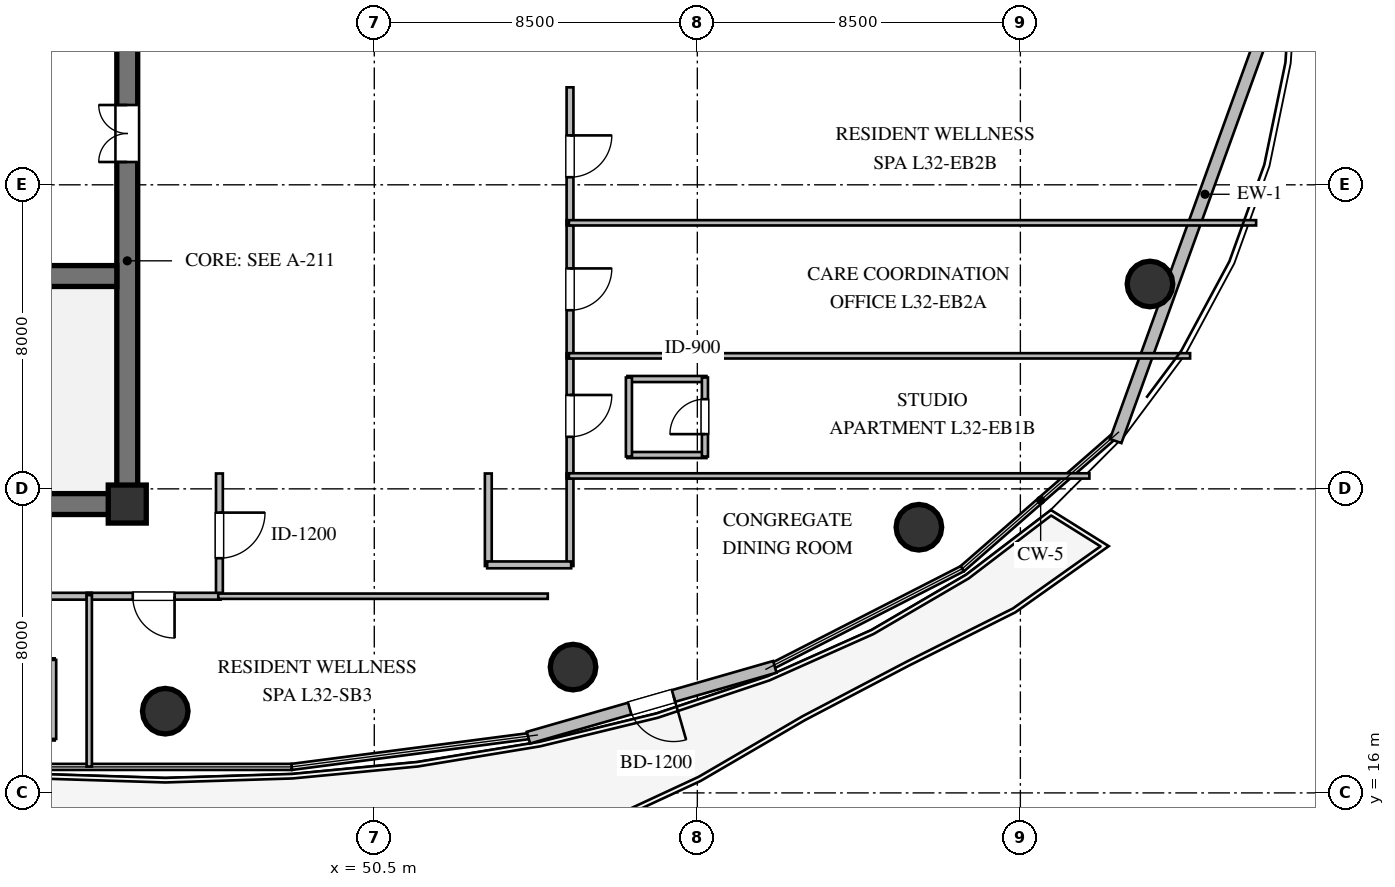
"""IFC4 building model, lengths in metres.
Left out: names, types, materials, properties, quantities, classifications, styles, units other than length and angle.
Written with IfcOpenShell. Run it as: python <this file> out.ifc"""

import sys

from ifc_helpers import new_model, si_unit, direction, frame, frame_2d, origin, origin_2d, place, context, subcontext, project, spatial, rectangle, circle, extrude, element, fill, save


model = new_model("IFC4")
c1 = context("Model", 3, precision=1e-05, world=origin(), true_north=direction((0.0, 1.0)))
c2 = subcontext(c1, "Body", "Model", "MODEL_VIEW")
j1 = project(units=[si_unit("LENGTHUNIT", "METRE"), si_unit("PLANEANGLEUNIT", "RADIAN")], contexts=[c1])
p1 = place(None, origin())
s1 = spatial("IfcSite", under=j1, at=p1, CompositionType="ELEMENT")
p2 = place(p1, origin())
s2 = spatial("IfcBuilding", under=s1, at=p2, CompositionType="ELEMENT")
p3 = place(p2, frame((0.0, 0.0, 124.2)))
s3 = spatial("IfcBuildingStorey", under=s2, at=p3, CompositionType="ELEMENT", Elevation=124.2)
p4 = place(p3, frame((21.725, 23.6, 0.0), z_axis=(0.0, 0.0, 1.0), x_axis=(1.0, 0.0, 0.0)))
e1 = element("IfcWall", 1, at=p4, inside=s3, PredefinedType="SHEAR", context=c2, shape_type="SweptSolid", body=[
    extrude(rectangle(XDim=22.55, YDim=0.55, at=frame_2d((11.275, 0.0))), origin(), (0.0, 0.0, 1.0), 3.36),
])
p5 = place(p3, frame((44.0, 23.875, 0.0), z_axis=(0.0, 0.0, 1.0), x_axis=(0.0, 1.0, 0.0)))
e2 = element("IfcWall", 2, at=p5, inside=s3, PredefinedType="SHEAR", context=c2, shape_type="SweptSolid", body=[
    extrude(rectangle(XDim=12.25, YDim=0.55, at=frame_2d((6.125, 0.0))), origin(), (0.0, 0.0, 1.0), 3.36),
])
p6 = place(p5, frame((8.725, 0.0, 0.0)))
e3 = element("IfcOpeningElement", 3, at=p6, cuts=e2, PredefinedType="OPENING", context=c2, shape_type="SweptSolid", body=[
    extrude(rectangle(XDim=1.5, YDim=2.15, at=frame_2d((0.75, 1.075))), frame((0.0, 0.285, 0.0), z_axis=(0.0, -1.0, 0.0), x_axis=(1.0, 0.0, 0.0)), (0.0, 0.0, 1.0), 0.57),
])
p7 = place(p3, frame((22.275, 29.6, 0.0), z_axis=(0.0, 0.0, 1.0), x_axis=(1.0, 0.0, 0.0)))
e4 = element("IfcWall", 4, at=p7, inside=s3, PredefinedType="SHEAR", context=c2, shape_type="SweptSolid", body=[
    extrude(rectangle(XDim=21.45, YDim=0.55, at=frame_2d((10.725, 0.0))), origin(), (0.0, 0.0, 1.0), 3.36),
])
p8 = place(p7, frame((12.175, 0.0, 0.0)))
e5 = element("IfcOpeningElement", 5, at=p8, cuts=e4, PredefinedType="OPENING", context=c2, shape_type="SweptSolid", body=[
    extrude(rectangle(XDim=1.15, YDim=2.1, at=frame_2d((0.575, 1.05))), frame((0.0, 0.285, 0.0), z_axis=(0.0, -1.0, 0.0), x_axis=(1.0, 0.0, 0.0)), (0.0, 0.0, 1.0), 0.57),
])
p9 = place(p3, frame((44.0, 23.6, 0.0), z_axis=(0.0, 0.0, 1.0), x_axis=(1.0, 0.0, 0.0)))
e6 = element("IfcColumn", 6, at=p9, inside=s3, PredefinedType="COLUMN", context=c2, shape_type="SweptSolid", body=[
    extrude(rectangle(XDim=1.0, YDim=1.0, at=origin_2d()), origin(), (0.0, 0.0, 1.0), 3.6),
])
for number, where, z_axis, x_axis in (
    (7, (45.0, 18.15, 0.0), (0.0, 0.0, 1.0), (1.0, 0.0, 0.0)),
    (8, (55.73, 19.31, 0.0), (0.0, 0.0, 1.0), (1.0, 0.0, 0.0)),
    (9, (64.83, 22.99, 0.0), (0.0, 0.0, 1.0), (1.0, 0.0, 0.0)),
    (10, (70.91, 29.39, 0.0), (0.0, 0.0, 1.0), (1.0, 0.0, 0.0)),
):
    element("IfcColumn", number, at=place(p3, frame(where, z_axis=z_axis, x_axis=x_axis)), inside=s3, PredefinedType="COLUMN", context=c2, shape_type="SweptSolid", body=[
        extrude(circle(Radius=0.6, at=origin_2d()), origin(), (0.0, 0.0, 1.0), 3.6),
    ])
p10 = place(p3, frame((74.708, 38.244, 0.0), z_axis=(0.0, 0.0, 1.0), x_axis=(-0.340324669139, -0.94030799187, 0.0)))
e11 = element("IfcWall", 11, at=p10, inside=s3, PredefinedType="STANDARD", context=c2, shape_type="SweptSolid", body=[
    extrude(rectangle(XDim=13.81, YDim=0.32, at=frame_2d((6.905, 0.0))), origin(), (0.0, 0.0, 1.0), 3.36),
])
p11 = place(p3, frame((61.039, 19.317, 0.0), z_axis=(0.0, 0.0, 1.0), x_axis=(-0.96106509915, -0.276322049784, 0.0)))
e12 = element("IfcWall", 12, at=p11, inside=s3, PredefinedType="STANDARD", context=c2, shape_type="SweptSolid", body=[
    extrude(rectangle(XDim=6.746, YDim=0.32, at=frame_2d((3.373, 0.0))), origin(), (0.0, 0.0, 1.0), 3.36),
])
p12 = place(p11, frame((2.773, 0.0, 0.0)))
e13 = element("IfcOpeningElement", 13, at=p12, cuts=e12, PredefinedType="OPENING", context=c2, shape_type="SweptSolid", body=[
    extrude(rectangle(XDim=1.2, YDim=2.15, at=frame_2d((0.6, 1.075))), frame((0.0, 0.17, 0.0), z_axis=(0.0, -1.0, 0.0), x_axis=(1.0, 0.0, 0.0)), (0.0, 0.0, 1.0), 0.34),
])
p13 = place(p3, frame((57.16, 24.89, 0.0), z_axis=(0.0, 0.0, 1.0), x_axis=(1.0, 0.0, 0.0)))
e14 = element("IfcWall", 14, at=p13, inside=s3, PredefinedType="PLUMBINGWALL", context=c2, shape_type="SweptSolid", body=[
    extrude(rectangle(XDim=2.08, YDim=0.16, at=frame_2d((1.04, 0.0))), origin(), (0.0, 0.0, 1.0), 3.36),
])
p14 = place(p3, frame((57.16, 26.89, 0.0), z_axis=(0.0, 0.0, 1.0), x_axis=(1.0, 0.0, 0.0)))
e15 = element("IfcWall", 15, at=p14, inside=s3, PredefinedType="PLUMBINGWALL", context=c2, shape_type="SweptSolid", body=[
    extrude(rectangle(XDim=2.08, YDim=0.16, at=frame_2d((1.04, 0.0))), origin(), (0.0, 0.0, 1.0), 2.806),
])
p15 = place(p3, frame((57.2, 24.85, 0.0), z_axis=(0.0, 0.0, 1.0), x_axis=(0.0, 1.0, 0.0)))
e16 = element("IfcWall", 16, at=p15, inside=s3, PredefinedType="PLUMBINGWALL", context=c2, shape_type="SweptSolid", body=[
    extrude(rectangle(XDim=2.08, YDim=0.16, at=frame_2d((1.04, 0.0))), origin(), (0.0, 0.0, 1.0), 3.36),
])
p16 = place(p3, frame((59.2, 24.85, 0.0), z_axis=(0.0, 0.0, 1.0), x_axis=(0.0, 1.0, 0.0)))
e17 = element("IfcWall", 17, at=p16, inside=s3, PredefinedType="PLUMBINGWALL", context=c2, shape_type="SweptSolid", body=[
    extrude(rectangle(XDim=2.08, YDim=0.16, at=frame_2d((1.04, 0.0))), origin(), (0.0, 0.0, 1.0), 2.996),
])
p17 = place(p16, frame((0.59, 0.0, 0.0)))
e18 = element("IfcOpeningElement", 18, at=p17, cuts=e17, PredefinedType="OPENING", context=c2, shape_type="SweptSolid", body=[
    extrude(rectangle(XDim=0.92, YDim=2.1, at=frame_2d((0.46, 1.05))), frame((0.0, 0.09, 0.0), z_axis=(0.0, -1.0, 0.0), x_axis=(1.0, 0.0, 0.0)), (0.0, 0.0, 1.0), 0.18),
])
for number, where, z_axis, x_axis in (
    (19, (40.01, 17.46, 0.0), (0.0, 0.0, 1.0), (1.0, 0.0, 0.0)),
    (20, (40.01, 19.46, 0.0), (0.0, 0.0, 1.0), (1.0, 0.0, 0.0)),
    (21, (42.05, 17.42, 0.0), (0.0, 0.0, 1.0), (0.0, 1.0, 0.0)),
):
    element("IfcWall", number, at=place(p3, frame(where, z_axis=z_axis, x_axis=x_axis)), inside=s3, PredefinedType="PLUMBINGWALL", context=c2, shape_type="SweptSolid", body=[
        extrude(rectangle(XDim=2.08, YDim=0.16, at=frame_2d((1.04, 0.0))), origin(), (0.0, 0.0, 1.0), 3.36),
    ])
p18 = place(p3, frame((46.425, 24.405, 0.0), z_axis=(0.0, 0.0, 1.0), x_axis=(0.0, -1.0, 0.0)))
e22 = element("IfcWall", 22, at=p18, inside=s3, PredefinedType="PARTITIONING", context=c2, shape_type="SweptSolid", body=[
    extrude(rectangle(XDim=3.26, YDim=0.18, at=frame_2d((1.63, 0.0))), origin(), (0.0, 0.0, 1.0), 3.36),
])
p19 = place(p18, frame((1.03, 0.0, 0.0)))
e23 = element("IfcOpeningElement", 23, at=p19, cuts=e22, PredefinedType="OPENING", context=c2, shape_type="SweptSolid", body=[
    extrude(rectangle(XDim=1.2, YDim=2.15, at=frame_2d((0.6, 1.075))), frame((0.0, 0.1, 0.0), z_axis=(0.0, -1.0, 0.0), x_axis=(1.0, 0.0, 0.0)), (0.0, 0.0, 1.0), 0.2),
])
for number, where, z_axis, x_axis in (
    (24, (55.65, 24.405, 0.0), (0.0, 0.0, 1.0), (0.0, -1.0, 0.0)),
    (25, (53.5, 21.97, 0.0), (0.0, 0.0, 1.0), (0.0, 1.0, 0.0)),
):
    element("IfcWall", number, at=place(p3, frame(where, z_axis=z_axis, x_axis=x_axis)), inside=s3, PredefinedType="PARTITIONING", context=c2, shape_type="SweptSolid", body=[
        extrude(rectangle(XDim=2.435, YDim=0.18, at=frame_2d((1.218, 0.0))), origin(), (0.0, 0.0, 1.0), 3.36),
    ])
p20 = place(p3, frame((55.68, 22.0, 0.0), z_axis=(0.0, 0.0, 1.0), x_axis=(-1.0, 0.0, 0.0)))
e26 = element("IfcWall", 26, at=p20, inside=s3, PredefinedType="PARTITIONING", context=c2, shape_type="SweptSolid", body=[
    extrude(rectangle(XDim=2.21, YDim=0.18, at=frame_2d((1.105, 0.0))), origin(), (0.0, 0.0, 1.0), 3.36),
])
p21 = place(p3, frame((55.65, 27.565, 0.0), z_axis=(0.0, 0.0, 1.0), x_axis=(0.0, -1.0, 0.0)))
e27 = element("IfcWall", 27, at=p21, inside=s3, PredefinedType="PARTITIONING", context=c2, shape_type="SweptSolid", body=[
    extrude(rectangle(XDim=3.29, YDim=0.18, at=frame_2d((1.645, 0.0))), origin(), (0.0, 0.0, 1.0), 3.36),
])
p22 = place(p21, frame((1.095, 0.0, 0.0)))
e28 = element("IfcOpeningElement", 28, at=p22, cuts=e27, PredefinedType="OPENING", context=c2, shape_type="SweptSolid", body=[
    extrude(rectangle(XDim=1.1, YDim=2.1, at=frame_2d((0.55, 1.05))), frame((0.0, 0.1, 0.0), z_axis=(0.0, -1.0, 0.0), x_axis=(1.0, 0.0, 0.0)), (0.0, 0.0, 1.0), 0.2),
])
p23 = place(p3, frame((55.65, 31.065, 0.0), z_axis=(0.0, 0.0, 1.0), x_axis=(0.0, -1.0, 0.0)))
e29 = element("IfcWall", 29, at=p23, inside=s3, PredefinedType="PARTITIONING", context=c2, shape_type="SweptSolid", body=[
    extrude(rectangle(XDim=3.63, YDim=0.18, at=frame_2d((1.815, 0.0))), origin(), (0.0, 0.0, 1.0), 3.36),
])
p24 = place(p23, frame((1.265, 0.0, 0.0)))
e30 = element("IfcOpeningElement", 30, at=p24, cuts=e29, PredefinedType="OPENING", context=c2, shape_type="SweptSolid", body=[
    extrude(rectangle(XDim=1.1, YDim=2.1, at=frame_2d((0.55, 1.05))), frame((0.0, 0.1, 0.0), z_axis=(0.0, -1.0, 0.0), x_axis=(1.0, 0.0, 0.0)), (0.0, 0.0, 1.0), 0.2),
])
p25 = place(p3, frame((55.65, 34.565, 0.0), z_axis=(0.0, 0.0, 1.0), x_axis=(0.0, -1.0, 0.0)))
e31 = element("IfcWall", 31, at=p25, inside=s3, PredefinedType="PARTITIONING", context=c2, shape_type="SweptSolid", body=[
    extrude(rectangle(XDim=3.63, YDim=0.18, at=frame_2d((1.815, 0.0))), origin(), (0.0, 0.0, 1.0), 3.36),
])
p26 = place(p25, frame((1.265, 0.0, 0.0)))
e32 = element("IfcOpeningElement", 32, at=p26, cuts=e31, PredefinedType="OPENING", context=c2, shape_type="SweptSolid", body=[
    extrude(rectangle(XDim=1.1, YDim=2.1, at=frame_2d((0.55, 1.05))), frame((0.0, 0.1, 0.0), z_axis=(0.0, -1.0, 0.0), x_axis=(1.0, 0.0, 0.0)), (0.0, 0.0, 1.0), 0.2),
])
p27 = place(p3, frame((43.065, 21.175, 0.0), z_axis=(0.0, 0.0, 1.0), x_axis=(-1.0, 0.0, 0.0)))
e33 = element("IfcWall", 33, at=p27, inside=s3, PredefinedType="PARTITIONING", context=c2, shape_type="SweptSolid", body=[
    extrude(rectangle(XDim=17.614, YDim=0.18, at=frame_2d((8.807, 0.0))), origin(), (0.0, 0.0, 1.0), 2.657),
])
p28 = place(p27, frame((6.515, 0.0, 0.0)))
e34 = element("IfcOpeningElement", 34, at=p28, cuts=e33, PredefinedType="OPENING", context=c2, shape_type="SweptSolid", body=[
    extrude(rectangle(XDim=1.1, YDim=2.1, at=frame_2d((0.55, 1.05))), frame((0.0, 0.1, 0.0), z_axis=(0.0, -1.0, 0.0), x_axis=(1.0, 0.0, 0.0)), (0.0, 0.0, 1.0), 0.2),
])
p29 = place(p3, frame((46.455, 21.175, 0.0), z_axis=(0.0, 0.0, 1.0), x_axis=(-1.0, 0.0, 0.0)))
e35 = element("IfcWall", 35, at=p29, inside=s3, PredefinedType="PARTITIONING", context=c2, shape_type="SweptSolid", body=[
    extrude(rectangle(XDim=3.52, YDim=0.18, at=frame_2d((1.76, 0.0))), origin(), (0.0, 0.0, 1.0), 2.996),
])
p30 = place(p29, frame((1.21, 0.0, 0.0)))
e36 = element("IfcOpeningElement", 36, at=p30, cuts=e35, PredefinedType="OPENING", context=c2, shape_type="SweptSolid", body=[
    extrude(rectangle(XDim=1.1, YDim=2.1, at=frame_2d((0.55, 1.05))), frame((0.0, 0.1, 0.0), z_axis=(0.0, -1.0, 0.0), x_axis=(1.0, 0.0, 0.0)), (0.0, 0.0, 1.0), 0.2),
])
p31 = place(p3, frame((55.62, 24.34, 0.0), z_axis=(0.0, 0.0, 1.0), x_axis=(1.0, 0.0, 0.0)))
e37 = element("IfcWall", 37, at=p31, inside=s3, PredefinedType="PARTITIONING", context=c2, shape_type="SweptSolid", body=[
    extrude(rectangle(XDim=13.696, YDim=0.14, at=frame_2d((6.848, 0.0))), origin(), (0.0, 0.0, 1.0), 3.36),
])
p32 = place(p3, frame((55.065, 21.175, 0.0), z_axis=(0.0, 0.0, 1.0), x_axis=(-1.0, 0.0, 0.0)))
e38 = element("IfcWall", 38, at=p32, inside=s3, PredefinedType="PARTITIONING", context=c2, shape_type="SweptSolid", body=[
    extrude(rectangle(XDim=8.67, YDim=0.14, at=frame_2d((4.335, 0.0))), origin(), (0.0, 0.0, 1.0), 2.996),
])
p33 = place(p3, frame((55.62, 27.5, 0.0), z_axis=(0.0, 0.0, 1.0), x_axis=(1.0, 0.0, 0.0)))
e39 = element("IfcWall", 39, at=p33, inside=s3, PredefinedType="PARTITIONING", context=c2, shape_type="SweptSolid", body=[
    extrude(rectangle(XDim=16.346, YDim=0.14, at=frame_2d((8.173, 0.0))), origin(), (0.0, 0.0, 1.0), 2.806),
])
p34 = place(p3, frame((55.62, 31.0, 0.0), z_axis=(0.0, 0.0, 1.0), x_axis=(1.0, 0.0, 0.0)))
e40 = element("IfcWall", 40, at=p34, inside=s3, PredefinedType="PARTITIONING", context=c2, shape_type="SweptSolid", body=[
    extrude(rectangle(XDim=18.083, YDim=0.14, at=frame_2d((9.042, 0.0))), origin(), (0.0, 0.0, 1.0), 3.36),
])
p35 = place(p3, frame((43.0, 21.205, 0.0), z_axis=(0.0, 0.0, 1.0), x_axis=(0.0, -1.0, 0.0)))
e41 = element("IfcWall", 41, at=p35, inside=s3, PredefinedType="PARTITIONING", context=c2, shape_type="SweptSolid", body=[
    extrude(rectangle(XDim=4.511, YDim=0.14, at=frame_2d((2.255, 0.0))), origin(), (0.0, 0.0, 1.0), 3.36),
])
p36 = place(p12, origin())
e42 = element("IfcDoor", 42, at=p36, inside=s3, OperationType="SINGLE_SWING_LEFT", PredefinedType="DOOR", context=c2, shape_type="SweptSolid", body=[
    extrude(rectangle(XDim=1.2, YDim=2.15, at=frame_2d((0.6, 1.075))), frame((0.0, 0.025, 0.0), z_axis=(0.0, -1.0, 0.0), x_axis=(1.0, 0.0, 0.0)), (0.0, 0.0, 1.0), 0.05),
])
fill(e13, e42)
p37 = place(p6, origin())
e43 = element("IfcDoor", 43, at=p37, inside=s3, OperationType="DOUBLE_DOOR_SINGLE_SWING", PredefinedType="DOOR", context=c2, shape_type="SweptSolid", body=[
    extrude(rectangle(XDim=1.5, YDim=2.15, at=frame_2d((0.75, 1.075))), frame((0.0, 0.025, 0.0), z_axis=(0.0, -1.0, 0.0), x_axis=(1.0, 0.0, 0.0)), (0.0, 0.0, 1.0), 0.05),
])
fill(e3, e43)
p38 = place(p17, origin())
e44 = element("IfcDoor", 44, at=p38, inside=s3, OperationType="SINGLE_SWING_LEFT", PredefinedType="DOOR", context=c2, shape_type="SweptSolid", body=[
    extrude(rectangle(XDim=0.92, YDim=2.1, at=frame_2d((0.46, 1.05))), frame((0.0, 0.025, 0.0), z_axis=(0.0, -1.0, 0.0), x_axis=(1.0, 0.0, 0.0)), (0.0, 0.0, 1.0), 0.05),
])
fill(e18, e44)
p39 = place(p19, origin())
e45 = element("IfcDoor", 45, at=p39, inside=s3, OperationType="SINGLE_SWING_LEFT", PredefinedType="DOOR", context=c2, shape_type="SweptSolid", body=[
    extrude(rectangle(XDim=1.2, YDim=2.15, at=frame_2d((0.6, 1.075))), frame((0.0, 0.025, 0.0), z_axis=(0.0, -1.0, 0.0), x_axis=(1.0, 0.0, 0.0)), (0.0, 0.0, 1.0), 0.05),
])
fill(e23, e45)
p40 = place(p22, origin())
e46 = element("IfcDoor", 46, at=p40, inside=s3, OperationType="SINGLE_SWING_LEFT", PredefinedType="DOOR", context=c2, shape_type="SweptSolid", body=[
    extrude(rectangle(XDim=1.1, YDim=2.1, at=frame_2d((0.55, 1.05))), frame((0.0, 0.025, 0.0), z_axis=(0.0, -1.0, 0.0), x_axis=(1.0, 0.0, 0.0)), (0.0, 0.0, 1.0), 0.05),
])
fill(e28, e46)
p41 = place(p24, origin())
e47 = element("IfcDoor", 47, at=p41, inside=s3, OperationType="SINGLE_SWING_LEFT", PredefinedType="DOOR", context=c2, shape_type="SweptSolid", body=[
    extrude(rectangle(XDim=1.1, YDim=2.1, at=frame_2d((0.55, 1.05))), frame((0.0, 0.025, 0.0), z_axis=(0.0, -1.0, 0.0), x_axis=(1.0, 0.0, 0.0)), (0.0, 0.0, 1.0), 0.05),
])
fill(e30, e47)
p42 = place(p26, origin())
e48 = element("IfcDoor", 48, at=p42, inside=s3, OperationType="SINGLE_SWING_LEFT", PredefinedType="DOOR", context=c2, shape_type="SweptSolid", body=[
    extrude(rectangle(XDim=1.1, YDim=2.1, at=frame_2d((0.55, 1.05))), frame((0.0, 0.025, 0.0), z_axis=(0.0, -1.0, 0.0), x_axis=(1.0, 0.0, 0.0)), (0.0, 0.0, 1.0), 0.05),
])
fill(e32, e48)
p43 = place(p30, origin())
e49 = element("IfcDoor", 49, at=p43, inside=s3, OperationType="SINGLE_SWING_LEFT", PredefinedType="DOOR", context=c2, shape_type="SweptSolid", body=[
    extrude(rectangle(XDim=1.1, YDim=2.1, at=frame_2d((0.55, 1.05))), frame((0.0, 0.025, 0.0), z_axis=(0.0, -1.0, 0.0), x_axis=(1.0, 0.0, 0.0)), (0.0, 0.0, 1.0), 0.05),
])
fill(e36, e49)
save(model, sys.argv[1])
